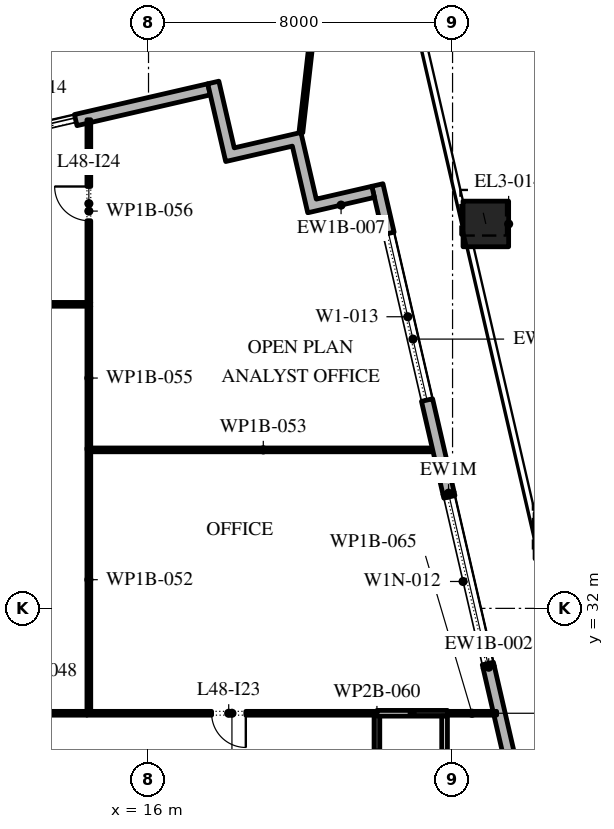
"""IFC4 building model, lengths in metres.
Left out: names, types, materials, properties, quantities, classifications, styles, units other than length and angle.
Written with IfcOpenShell. Run it as: python <this file> out.ifc"""

import sys

from ifc_helpers import new_model, si_unit, direction, frame, frame_2d, origin, origin_2d, place, context, subcontext, project, spatial, polyline, rectangle, outline, extrude, element, fill, save


model = new_model("IFC4")
c1 = context("Model", 3, precision=1e-05, world=origin(), true_north=direction((0.0, 1.0)))
c2 = subcontext(c1, "Body", "Model", "MODEL_VIEW")
j1 = project(units=[si_unit("LENGTHUNIT", "METRE"), si_unit("PLANEANGLEUNIT", "RADIAN")], contexts=[c1])
p1 = place(None, origin())
s1 = spatial("IfcSite", under=j1, at=p1, CompositionType="ELEMENT")
p2 = place(p1, origin())
s2 = spatial("IfcBuilding", under=s1, at=p2, CompositionType="ELEMENT")
p3 = place(p2, frame((0.0, 0.0, 217.8)))
s3 = spatial("IfcBuildingStorey", under=s2, at=p3, CompositionType="ELEMENT", Elevation=217.8)
p4 = place(p3, frame((26.771, 33.904, 0.0), z_axis=(-0.013461799865, 0.058373149415, 0.998204064995), x_axis=(-0.974423835271, -0.224718021653, 0.0)))
e1 = element("IfcColumn", 1, at=p4, inside=s3, PredefinedType="COLUMN", context=c2, shape_type="SweptSolid", body=[
    extrude(rectangle(XDim=1.2, YDim=1.2, at=origin_2d()), origin(), (0.0, 0.0, 1.0), 4.208),
])
p5 = place(p3, frame((24.876, 42.115, 0.0), z_axis=(-0.016176212764, 0.069980963462, 0.99741716192), x_axis=(-0.974309502923, -0.225213215672, 0.0)))
e2 = element("IfcColumn", 2, at=p5, inside=s3, PredefinedType="COLUMN", context=c2, shape_type="SweptSolid", body=[
    extrude(rectangle(XDim=1.2, YDim=1.2, at=origin_2d()), origin(), (0.0, 0.0, 1.0), 4.211),
])
p6 = place(p3, frame((33.157, -5.092, 0.0), z_axis=(0.0, 0.0, 1.0), x_axis=(-0.22494993302, 0.974370323663, 0.0)))
e3 = element("IfcWall", 3, at=p6, inside=s3, PredefinedType="STANDARD", context=c2, shape_type="SweptSolid", body=[
    extrude(rectangle(XDim=36.478, YDim=0.3, at=frame_2d((18.239, 0.0))), origin(), (0.0, 0.0, 1.0), 3.95),
])
p7 = place(p6, frame((2.207, 0.0, 0.0)))
e4 = element("IfcOpeningElement", 4, at=p7, cuts=e3, PredefinedType="OPENING", context=c2, shape_type="SweptSolid", body=[
    extrude(rectangle(XDim=2.4, YDim=3.075, at=frame_2d((1.2, 1.538))), frame((0.0, 0.16, 0.0), z_axis=(0.0, -1.0, 0.0), x_axis=(1.0, 0.0, 0.0)), (0.0, 0.0, 1.0), 0.32),
])
p8 = place(p6, frame((8.121, 0.0, 0.45)))
e5 = element("IfcOpeningElement", 5, at=p8, cuts=e3, PredefinedType="OPENING", context=c2, shape_type="SweptSolid", body=[
    extrude(rectangle(XDim=4.5, YDim=2.825, at=frame_2d((2.25, 1.413))), frame((0.0, 0.16, 0.0), z_axis=(0.0, -1.0, 0.0), x_axis=(1.0, 0.0, 0.0)), (0.0, 0.0, 1.0), 0.32),
])
p9 = place(p6, frame((15.236, 0.0, 0.45)))
e6 = element("IfcOpeningElement", 6, at=p9, cuts=e3, PredefinedType="OPENING", context=c2, shape_type="SweptSolid", body=[
    extrude(rectangle(XDim=4.5, YDim=2.825, at=frame_2d((2.25, 1.413))), frame((0.0, 0.16, 0.0), z_axis=(0.0, -1.0, 0.0), x_axis=(1.0, 0.0, 0.0)), (0.0, 0.0, 1.0), 0.32),
])
p10 = place(p6, frame((22.35, 0.0, 0.45)))
e7 = element("IfcOpeningElement", 7, at=p10, cuts=e3, PredefinedType="OPENING", context=c2, shape_type="SweptSolid", body=[
    extrude(rectangle(XDim=4.5, YDim=2.95, at=frame_2d((2.25, 1.475))), frame((0.0, 0.16, 0.0), z_axis=(0.0, -1.0, 0.0), x_axis=(1.0, 0.0, 0.0)), (0.0, 0.0, 1.0), 0.32),
])
p11 = place(p6, frame((30.514, 0.0, 0.0)))
e8 = element("IfcOpeningElement", 8, at=p11, cuts=e3, PredefinedType="OPENING", context=c2, shape_type="SweptSolid", body=[
    extrude(rectangle(XDim=2.4, YDim=3.4, at=frame_2d((1.2, 1.7))), frame((0.0, 0.16, 0.0), z_axis=(0.0, -1.0, 0.0), x_axis=(1.0, 0.0, 0.0)), (0.0, 0.0, 1.0), 0.32),
])
p12 = place(p3, frame((17.592, 45.657, 0.0), z_axis=(0.0, 0.0, 1.0), x_axis=(-0.974370243697, -0.224950279389, 0.0)))
e9 = element("IfcWall", 9, at=p12, inside=s3, PredefinedType="STANDARD", context=c2, shape_type="SweptSolid", body=[
    extrude(rectangle(XDim=49.5, YDim=0.3, at=frame_2d((24.75, 0.0))), origin(), (0.0, 0.0, 1.0), 3.95),
])
p13 = place(p12, frame((3.6, 0.0, 0.0)))
e10 = element("IfcOpeningElement", 10, at=p13, cuts=e9, PredefinedType="OPENING", context=c2, shape_type="SweptSolid", body=[
    extrude(rectangle(XDim=2.4, YDim=2.85, at=frame_2d((1.2, 1.425))), frame((0.0, 0.16, 0.0), z_axis=(0.0, -1.0, 0.0), x_axis=(1.0, 0.0, 0.0)), (0.0, 0.0, 1.0), 0.32),
])
p14 = place(p12, frame((9.9, 0.0, 0.45)))
e11 = element("IfcOpeningElement", 11, at=p14, cuts=e9, PredefinedType="OPENING", context=c2, shape_type="SweptSolid", body=[
    extrude(rectangle(XDim=4.5, YDim=2.4, at=frame_2d((2.25, 1.2))), frame((0.0, 0.16, 0.0), z_axis=(0.0, -1.0, 0.0), x_axis=(1.0, 0.0, 0.0)), (0.0, 0.0, 1.0), 0.32),
])
p15 = place(p12, frame((18.2, 0.0, 0.45)))
e12 = element("IfcOpeningElement", 12, at=p15, cuts=e9, PredefinedType="OPENING", context=c2, shape_type="SweptSolid", body=[
    extrude(rectangle(XDim=4.5, YDim=2.4, at=frame_2d((2.25, 1.2))), frame((0.0, 0.16, 0.0), z_axis=(0.0, -1.0, 0.0), x_axis=(1.0, 0.0, 0.0)), (0.0, 0.0, 1.0), 0.32),
])
p16 = place(p12, frame((26.5, 0.0, 0.45)))
e13 = element("IfcOpeningElement", 13, at=p16, cuts=e9, PredefinedType="OPENING", context=c2, shape_type="SweptSolid", body=[
    extrude(rectangle(XDim=4.5, YDim=2.4, at=frame_2d((2.25, 1.2))), frame((0.0, 0.16, 0.0), z_axis=(0.0, -1.0, 0.0), x_axis=(1.0, 0.0, 0.0)), (0.0, 0.0, 1.0), 0.32),
])
p17 = place(p12, frame((35.85, 0.0, 0.0)))
e14 = element("IfcOpeningElement", 14, at=p17, cuts=e9, PredefinedType="OPENING", context=c2, shape_type="SweptSolid", body=[
    extrude(rectangle(XDim=2.4, YDim=3.5, at=frame_2d((1.2, 1.75))), frame((0.0, 0.16, 0.0), z_axis=(0.0, -1.0, 0.0), x_axis=(1.0, 0.0, 0.0)), (0.0, 0.0, 1.0), 0.32),
])
p18 = place(p12, frame((43.1, 0.0, 0.45)))
e15 = element("IfcOpeningElement", 15, at=p18, cuts=e9, PredefinedType="OPENING", context=c2, shape_type="SweptSolid", body=[
    extrude(rectangle(XDim=4.5, YDim=2.525, at=frame_2d((2.25, 1.262))), frame((0.0, 0.16, 0.0), z_axis=(0.0, -1.0, 0.0), x_axis=(1.0, 0.0, 0.0)), (0.0, 0.0, 1.0), 0.32),
])
p19 = place(p3, origin())
e16 = element("IfcWall", 16, at=p19, inside=s3, PredefinedType="STANDARD", context=c2, shape_type="SweptSolid", body=[
    extrude(outline(polyline([(19.785, 44.162), (18.031, 43.757), (17.558, 45.803), (17.851, 45.871), (18.256, 44.117), (20.01, 44.522), (20.414, 42.768), (21.876, 43.105), (21.943, 42.813), (20.19, 42.408), (19.785, 44.162)])), origin(), (0.0, 0.0, 1.0), 3.95),
])
p20 = place(p3, frame((20.01, 44.522, -0.05), z_axis=(0.0, 0.0, 1.0), x_axis=(0.112780737816, 0.993619899749, 0.0)))
e17 = element("IfcWall", 17, at=p20, inside=s3, PredefinedType="STANDARD", context=c2, shape_type="SweptSolid", body=[
    extrude(rectangle(XDim=6.33, YDim=0.1, at=frame_2d((3.165, 0.0))), origin(), (0.0, 0.0, 1.0), 4.0),
])
p21 = place(p3, frame((11.575, 29.24, 0.0), z_axis=(0.0, 0.0, 1.0), x_axis=(1.0, 0.0, 0.0)))
e18 = element("IfcWall", 18, at=p21, inside=s3, PredefinedType="PARTITIONING", context=c2, shape_type="SweptSolid", body=[
    extrude(rectangle(XDim=2.805, YDim=0.1, at=frame_2d((1.402, 0.0))), origin(), (0.0, 0.0, 1.0), 3.95),
])
p22 = place(p3, frame((14.38, 29.24, 0.0), z_axis=(0.0, 0.0, 1.0), x_axis=(1.0, 0.0, 0.0)))
e19 = element("IfcWall", 19, at=p22, inside=s3, PredefinedType="PARTITIONING", context=c2, shape_type="SweptSolid", body=[
    extrude(rectangle(XDim=7.63, YDim=0.1, at=frame_2d((3.815, 0.0))), origin(), (0.0, 0.0, 1.0), 3.95),
])
p23 = place(p22, frame((3.28, 0.0, 0.0)))
e20 = element("IfcOpeningElement", 20, at=p23, cuts=e19, PredefinedType="OPENING", context=c2, shape_type="SweptSolid", body=[
    extrude(rectangle(XDim=0.9, YDim=2.1, at=frame_2d((0.45, 1.05))), frame((0.0, 0.06, 0.0), z_axis=(0.0, -1.0, 0.0), x_axis=(1.0, 0.0, 0.0)), (0.0, 0.0, 1.0), 0.12),
])
p24 = place(p3, frame((14.43, 36.22, 0.0), z_axis=(0.0, 0.0, 1.0), x_axis=(0.0, -1.0, 0.0)))
e21 = element("IfcWall", 21, at=p24, inside=s3, PredefinedType="PARTITIONING", context=c2, shape_type="SweptSolid", body=[
    extrude(rectangle(XDim=6.93, YDim=0.1, at=frame_2d((3.465, 0.0))), origin(), (0.0, 0.0, 1.0), 3.95),
])
p25 = place(p3, frame((14.48, 36.17, 0.0), z_axis=(0.0, 0.0, 1.0), x_axis=(1.0, 0.0, 0.0)))
e22 = element("IfcWall", 22, at=p25, inside=s3, PredefinedType="PARTITIONING", context=c2, shape_type="SweptSolid", body=[
    extrude(rectangle(XDim=9.08, YDim=0.1, at=frame_2d((4.54, 0.0))), origin(), (0.0, 0.0, 1.0), 3.95),
])
p26 = place(p3, frame((14.48, 40.0, 0.0), z_axis=(0.0, 0.0, 1.0), x_axis=(-1.0, 0.0, 0.0)))
e23 = element("IfcWall", 23, at=p26, inside=s3, PredefinedType="PARTITIONING", context=c2, shape_type="SweptSolid", body=[
    extrude(rectangle(XDim=13.415, YDim=0.1, at=frame_2d((6.708, 0.0))), origin(), (0.0, 0.0, 1.0), 3.95),
])
p27 = place(p3, frame((14.43, 39.95, 0.0), z_axis=(0.0, 0.0, 1.0), x_axis=(0.0, -1.0, 0.0)))
e24 = element("IfcWall", 24, at=p27, inside=s3, PredefinedType="PARTITIONING", context=c2, shape_type="SweptSolid", body=[
    extrude(rectangle(XDim=3.78, YDim=0.1, at=frame_2d((1.89, 0.0))), origin(), (0.0, 0.0, 1.0), 3.95),
])
p28 = place(p3, frame((14.43, 44.856, 0.0), z_axis=(0.0, 0.0, 1.0), x_axis=(0.0, -1.0, 0.0)))
e25 = element("IfcWall", 25, at=p28, inside=s3, PredefinedType="PARTITIONING", context=c2, shape_type="SweptSolid", body=[
    extrude(rectangle(XDim=4.806, YDim=0.1, at=frame_2d((2.403, 0.0))), origin(), (0.0, 0.0, 1.0), 3.95),
])
p29 = place(p28, frame((1.756, 0.0, 0.0)))
e26 = element("IfcOpeningElement", 26, at=p29, cuts=e25, PredefinedType="OPENING", context=c2, shape_type="SweptSolid", body=[
    extrude(rectangle(XDim=0.9, YDim=2.1, at=frame_2d((0.45, 1.05))), frame((0.0, 0.06, 0.0), z_axis=(0.0, -1.0, 0.0), x_axis=(1.0, 0.0, 0.0)), (0.0, 0.0, 1.0), 0.12),
])
p30 = place(p3, frame((22.01, 27.2, 0.0), z_axis=(0.0, 0.0, 1.0), x_axis=(0.0, 1.0, 0.0)))
e27 = element("IfcWall", 27, at=p30, inside=s3, PredefinedType="PARTITIONING", context=c2, shape_type="SweptSolid", body=[
    extrude(rectangle(XDim=1.99, YDim=0.15, at=frame_2d((0.995, 0.0))), origin(), (0.0, 0.0, 1.0), 3.95),
])
p31 = place(p3, frame((22.01, 29.24, 0.0), z_axis=(0.0, 0.0, 1.0), x_axis=(1.0, 0.0, 0.0)))
e28 = element("IfcWall", 28, at=p31, inside=s3, PredefinedType="PARTITIONING", context=c2, shape_type="SweptSolid", body=[
    extrude(rectangle(XDim=1.855, YDim=0.15, at=frame_2d((0.927, 0.0))), origin(), (0.0, 0.0, 1.0), 3.95),
])
p32 = place(p3, frame((23.79, 29.165, 0.0), z_axis=(0.0, 0.0, 1.0), x_axis=(0.0, -1.0, 0.0)))
e29 = element("IfcWall", 29, at=p32, inside=s3, PredefinedType="PARTITIONING", context=c2, shape_type="SweptSolid", body=[
    extrude(rectangle(XDim=1.965, YDim=0.15, at=frame_2d((0.982, 0.0))), origin(), (0.0, 0.0, 1.0), 3.95),
])
p33 = place(p3, frame((23.865, 29.24, 0.0), z_axis=(0.0, 0.0, 1.0), x_axis=(1.0, 0.0, 0.0)))
e30 = element("IfcWall", 30, at=p33, inside=s3, PredefinedType="PARTITIONING", context=c2, shape_type="SweptSolid", body=[
    extrude(rectangle(XDim=1.295, YDim=0.1, at=frame_2d((0.647, 0.0))), origin(), (0.0, 0.0, 1.0), 3.95),
])
p34 = place(p3, frame((24.951, 30.451, 0.0), z_axis=(0.0, 0.0, 1.0), x_axis=(-0.224969521518, 0.974365801118, 0.0)))
e31 = element("IfcWall", 31, at=p34, inside=s3, PredefinedType="STANDARD", context=c2, shape_type="SweptSolid", body=[
    extrude(rectangle(XDim=4.7, YDim=0.3, at=frame_2d((2.35, 0.0))), origin(), (0.0, 0.0, 1.0), 3.114),
])
p35 = place(p34, frame((0.1, 0.0, 0.45)))
e32 = element("IfcOpeningElement", 32, at=p35, cuts=e31, PredefinedType="OPENING", context=c2, shape_type="SweptSolid", body=[
    extrude(rectangle(XDim=4.5, YDim=2.525, at=frame_2d((2.25, 1.262))), frame((0.0, 0.16, 0.0), z_axis=(0.0, -1.0, 0.0), x_axis=(1.0, 0.0, 0.0)), (0.0, 0.0, 1.0), 0.32),
])
p36 = place(p3, frame((23.894, 35.031, 0.0), z_axis=(0.0, 0.0, 1.0), x_axis=(-0.224940929452, 0.974372402245, 0.0)))
e33 = element("IfcWall", 33, at=p36, inside=s3, PredefinedType="STANDARD", context=c2, shape_type="SweptSolid", body=[
    extrude(rectangle(XDim=8.322, YDim=0.3, at=frame_2d((4.161, 0.0))), origin(), (0.0, 0.0, 1.0), 3.95),
])
p37 = place(p36, frame((2.514, 0.0, 0.45)))
e34 = element("IfcOpeningElement", 34, at=p37, cuts=e33, PredefinedType="OPENING", context=c2, shape_type="SweptSolid", body=[
    extrude(rectangle(XDim=4.5, YDim=3.05, at=frame_2d((2.25, 1.525))), frame((0.0, 0.16, 0.0), z_axis=(0.0, -1.0, 0.0), x_axis=(1.0, 0.0, 0.0)), (0.0, 0.0, 1.0), 0.32),
])
p38 = place(p35, origin())
e35 = element("IfcWindow", 35, at=p38, inside=s3, PartitioningType="DOUBLE_PANEL_VERTICAL", PredefinedType="WINDOW", context=c2, shape_type="SweptSolid", body=[
    extrude(rectangle(XDim=4.5, YDim=2.525, at=frame_2d((2.25, 1.262))), frame((0.0, 0.03, 0.0), z_axis=(0.0, -1.0, 0.0), x_axis=(1.0, 0.0, 0.0)), (0.0, 0.0, 1.0), 0.06),
])
fill(e32, e35)
p39 = place(p37, origin())
e36 = element("IfcWindow", 36, at=p39, inside=s3, PartitioningType="DOUBLE_PANEL_VERTICAL", PredefinedType="WINDOW", context=c2, shape_type="SweptSolid", body=[
    extrude(rectangle(XDim=4.5, YDim=3.05, at=frame_2d((2.25, 1.525))), frame((0.0, 0.03, 0.0), z_axis=(0.0, -1.0, 0.0), x_axis=(1.0, 0.0, 0.0)), (0.0, 0.0, 1.0), 0.06),
])
fill(e34, e36)
p40 = place(p13, origin())
e37 = element("IfcDoor", 37, at=p40, inside=s3, OperationType="DOUBLE_DOOR_SLIDING", PredefinedType="DOOR", context=c2, shape_type="SweptSolid", body=[
    extrude(rectangle(XDim=2.4, YDim=2.85, at=frame_2d((1.2, 1.425))), frame((0.0, 0.025, 0.0), z_axis=(0.0, -1.0, 0.0), x_axis=(1.0, 0.0, 0.0)), (0.0, 0.0, 1.0), 0.05),
])
fill(e10, e37)
p41 = place(p23, frame((0.9, 0.0, 0.0), z_axis=(0.0, 0.0, 1.0), x_axis=(-1.0, 0.0, 0.0)))
e38 = element("IfcDoor", 38, at=p41, inside=s3, OperationType="SINGLE_SWING_RIGHT", PredefinedType="DOOR", context=c2, shape_type="SweptSolid", body=[
    extrude(rectangle(XDim=0.9, YDim=2.1, at=frame_2d((0.45, 1.05))), frame((0.0, 0.025, 0.0), z_axis=(0.0, -1.0, 0.0), x_axis=(1.0, 0.0, 0.0)), (0.0, 0.0, 1.0), 0.05),
])
fill(e20, e38)
p42 = place(p29, frame((0.9, 0.0, 0.0), z_axis=(0.0, 0.0, 1.0), x_axis=(-1.0, 0.0, 0.0)))
e39 = element("IfcDoor", 39, at=p42, inside=s3, OperationType="SINGLE_SWING_LEFT", PredefinedType="DOOR", context=c2, shape_type="SweptSolid", body=[
    extrude(rectangle(XDim=0.9, YDim=2.1, at=frame_2d((0.45, 1.05))), frame((0.0, 0.025, 0.0), z_axis=(0.0, -1.0, 0.0), x_axis=(1.0, 0.0, 0.0)), (0.0, 0.0, 1.0), 0.05),
])
fill(e26, e39)
save(model, sys.argv[1])
